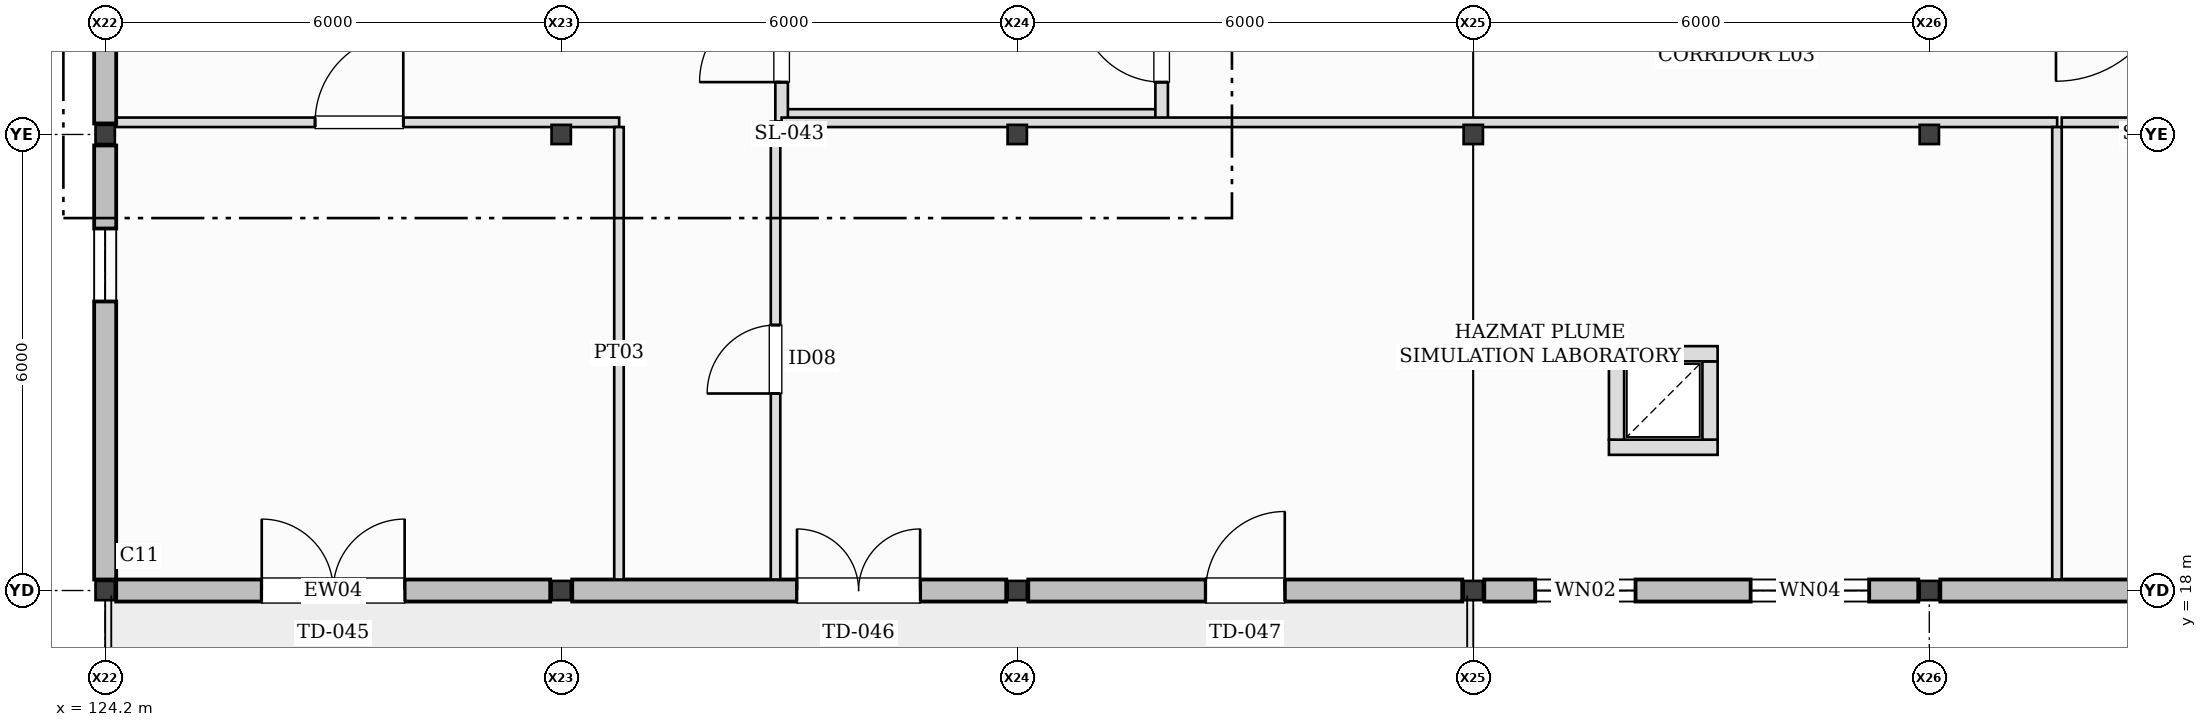
"""IFC4 building model, lengths in metres.
Left out: names, types, materials, properties, quantities, classifications, styles, units other than length and angle.
Written with IfcOpenShell. Run it as: python <this file> out.ifc"""

import sys

from ifc_helpers import new_model, si_unit, direction, frame, frame_2d, origin, origin_2d, place, context, subcontext, project, spatial, rectangle, i_section, extrude, element, fill, save


model = new_model("IFC4")
c1 = context("Model", 3, precision=1e-05, world=origin(), true_north=direction((0.0, 1.0)))
c2 = subcontext(c1, "Body", "Model", "MODEL_VIEW")
j1 = project(units=[si_unit("LENGTHUNIT", "METRE"), si_unit("PLANEANGLEUNIT", "RADIAN")], contexts=[c1])
p1 = place(None, origin())
s1 = spatial("IfcSite", under=j1, at=p1, CompositionType="ELEMENT")
p2 = place(p1, origin())
s2 = spatial("IfcBuilding", under=s1, at=p2, CompositionType="ELEMENT")
p3 = place(p2, frame((0.0, 0.0, 10.0)))
s3 = spatial("IfcBuildingStorey", under=s2, at=p3, CompositionType="ELEMENT", Elevation=10.0)
for number, where, z_axis, x_axis in (
    (1, (124.2, 18.0, 0.0), (0.0, 0.0, 1.0), (1.0, 0.0, 0.0)),
    (2, (124.2, 24.0, 0.0), (0.0, 0.0, 1.0), (1.0, 0.0, 0.0)),
    (3, (130.2, 18.0, 0.0), (0.0, 0.0, 1.0), (1.0, 0.0, 0.0)),
    (4, (130.2, 24.0, 0.0), (0.0, 0.0, 1.0), (1.0, 0.0, 0.0)),
    (5, (136.2, 18.0, 0.0), (0.0, 0.0, 1.0), (1.0, 0.0, 0.0)),
    (6, (136.2, 24.0, 0.0), (0.0, 0.0, 1.0), (1.0, 0.0, 0.0)),
    (7, (142.2, 18.0, 0.0), (0.0, 0.0, 1.0), (1.0, 0.0, 0.0)),
    (8, (142.2, 24.0, 0.0), (0.0, 0.0, 1.0), (1.0, 0.0, 0.0)),
    (9, (148.2, 18.0, 0.0), (0.0, 0.0, 1.0), (1.0, 0.0, 0.0)),
    (10, (148.2, 24.0, 0.0), (0.0, 0.0, 1.0), (1.0, 0.0, 0.0)),
):
    element("IfcColumn", number, at=place(p3, frame(where, z_axis=z_axis, x_axis=x_axis)), inside=s3, PredefinedType="COLUMN", context=c2, shape_type="SweptSolid", body=[
        extrude(i_section(OverallWidth=0.254, OverallDepth=0.253, WebThickness=0.009, FlangeThickness=0.014, at=origin_2d()), origin(), (0.0, 0.0, 1.0), 4.0),
    ])
p4 = place(p3, frame((124.345, 18.0, 0.0), z_axis=(0.0, 0.0, 1.0), x_axis=(1.0, 0.0, 0.0)))
e11 = element("IfcWall", 11, at=p4, inside=s3, PredefinedType="STANDARD", context=c2, shape_type="SweptSolid", body=[
    extrude(rectangle(XDim=5.71, YDim=0.29, at=frame_2d((2.855, 0.0))), origin(), (0.0, 0.0, 1.0), 4.0),
])
p5 = place(p4, frame((1.915, 0.0, 0.0)))
e12 = element("IfcOpeningElement", 12, at=p5, cuts=e11, PredefinedType="OPENING", context=c2, shape_type="SweptSolid", body=[
    extrude(rectangle(XDim=1.88, YDim=2.28, at=frame_2d((0.94, 1.14))), frame((0.0, 0.155, 0.0), z_axis=(0.0, -1.0, 0.0), x_axis=(1.0, 0.0, 0.0)), (0.0, 0.0, 1.0), 0.31),
])
p6 = place(p3, frame((130.345, 18.0, 0.0), z_axis=(0.0, 0.0, 1.0), x_axis=(1.0, 0.0, 0.0)))
e13 = element("IfcWall", 13, at=p6, inside=s3, PredefinedType="STANDARD", context=c2, shape_type="SweptSolid", body=[
    extrude(rectangle(XDim=5.71, YDim=0.29, at=frame_2d((2.855, 0.0))), origin(), (0.0, 0.0, 1.0), 4.0),
])
p7 = place(p6, frame((2.958, 0.0, 0.0)))
e14 = element("IfcOpeningElement", 14, at=p7, cuts=e13, PredefinedType="OPENING", context=c2, shape_type="SweptSolid", body=[
    extrude(rectangle(XDim=1.62, YDim=2.2, at=frame_2d((0.81, 1.1))), frame((0.0, 0.155, 0.0), z_axis=(0.0, -1.0, 0.0), x_axis=(1.0, 0.0, 0.0)), (0.0, 0.0, 1.0), 0.31),
])
p8 = place(p3, frame((136.345, 18.0, 0.0), z_axis=(0.0, 0.0, 1.0), x_axis=(1.0, 0.0, 0.0)))
e15 = element("IfcWall", 15, at=p8, inside=s3, PredefinedType="STANDARD", context=c2, shape_type="SweptSolid", body=[
    extrude(rectangle(XDim=5.71, YDim=0.29, at=frame_2d((2.855, 0.0))), origin(), (0.0, 0.0, 1.0), 4.0),
])
p9 = place(p8, frame((2.335, 0.0, 0.0)))
e16 = element("IfcOpeningElement", 16, at=p9, cuts=e15, PredefinedType="OPENING", context=c2, shape_type="SweptSolid", body=[
    extrude(rectangle(XDim=1.04, YDim=2.16, at=frame_2d((0.52, 1.08))), frame((0.0, 0.155, 0.0), z_axis=(0.0, -1.0, 0.0), x_axis=(1.0, 0.0, 0.0)), (0.0, 0.0, 1.0), 0.31),
])
p10 = place(p3, frame((142.345, 18.0, 0.0), z_axis=(0.0, 0.0, 1.0), x_axis=(1.0, 0.0, 0.0)))
e17 = element("IfcWall", 17, at=p10, inside=s3, PredefinedType="STANDARD", context=c2, shape_type="SweptSolid", body=[
    extrude(rectangle(XDim=5.71, YDim=0.29, at=frame_2d((2.855, 0.0))), origin(), (0.0, 0.0, 1.0), 4.0),
])
p11 = place(p10, frame((0.67, 0.0, 1.42)))
e18 = element("IfcOpeningElement", 18, at=p11, cuts=e17, PredefinedType="OPENING", context=c2, shape_type="SweptSolid", body=[
    extrude(rectangle(XDim=1.32, YDim=1.32, at=frame_2d((0.66, 0.66))), frame((0.0, 0.155, 0.0), z_axis=(0.0, -1.0, 0.0), x_axis=(1.0, 0.0, 0.0)), (0.0, 0.0, 1.0), 0.31),
])
p12 = place(p10, frame((3.504, 0.0, 1.28)))
e19 = element("IfcOpeningElement", 19, at=p12, cuts=e17, PredefinedType="OPENING", context=c2, shape_type="SweptSolid", body=[
    extrude(rectangle(XDim=1.56, YDim=1.56, at=frame_2d((0.78, 0.78))), frame((0.0, 0.155, 0.0), z_axis=(0.0, -1.0, 0.0), x_axis=(1.0, 0.0, 0.0)), (0.0, 0.0, 1.0), 0.31),
])
p13 = place(p3, frame((148.345, 18.0, 0.0), z_axis=(0.0, 0.0, 1.0), x_axis=(1.0, 0.0, 0.0)))
e20 = element("IfcWall", 20, at=p13, inside=s3, PredefinedType="STANDARD", context=c2, shape_type="SweptSolid", body=[
    extrude(rectangle(XDim=5.71, YDim=0.29, at=frame_2d((2.855, 0.0))), origin(), (0.0, 0.0, 1.0), 4.0),
])
p14 = place(p13, frame((3.567, 0.0, 0.86)))
e21 = element("IfcOpeningElement", 21, at=p14, cuts=e20, PredefinedType="OPENING", context=c2, shape_type="SweptSolid", body=[
    extrude(rectangle(XDim=0.9, YDim=0.9, at=frame_2d((0.45, 0.45))), frame((0.0, 0.155, 0.0), z_axis=(0.0, -1.0, 0.0), x_axis=(1.0, 0.0, 0.0)), (0.0, 0.0, 1.0), 0.31),
])
p15 = place(p3, frame((124.2, 23.855, 0.0), z_axis=(0.0, 0.0, 1.0), x_axis=(0.0, -1.0, 0.0)))
e22 = element("IfcWall", 22, at=p15, inside=s3, PredefinedType="STANDARD", context=c2, shape_type="SweptSolid", body=[
    extrude(rectangle(XDim=5.71, YDim=0.29, at=frame_2d((2.855, 0.0))), origin(), (0.0, 0.0, 1.0), 2.1),
])
p16 = place(p15, frame((1.092, 0.0, 0.82)))
e23 = element("IfcOpeningElement", 23, at=p16, cuts=e22, PredefinedType="OPENING", context=c2, shape_type="SweptSolid", body=[
    extrude(rectangle(XDim=0.96, YDim=0.96, at=frame_2d((0.48, 0.48))), frame((0.0, 0.155, 0.0), z_axis=(0.0, -1.0, 0.0), x_axis=(1.0, 0.0, 0.0)), (0.0, 0.0, 1.0), 0.31),
])
p17 = place(p3, frame((124.2, 29.855, 0.0), z_axis=(0.0, 0.0, 1.0), x_axis=(0.0, -1.0, 0.0)))
e24 = element("IfcWall", 24, at=p17, inside=s3, PredefinedType="STANDARD", context=c2, shape_type="SweptSolid", body=[
    extrude(rectangle(XDim=5.71, YDim=0.29, at=frame_2d((2.855, 0.0))), origin(), (0.0, 0.0, 1.0), 2.1),
])
p18 = place(p17, frame((0.775, 0.0, 0.82)))
e25 = element("IfcOpeningElement", 25, at=p18, cuts=e24, PredefinedType="OPENING", context=c2, shape_type="SweptSolid", body=[
    extrude(rectangle(XDim=1.02, YDim=1.02, at=frame_2d((0.51, 0.51))), frame((0.0, 0.155, 0.0), z_axis=(0.0, -1.0, 0.0), x_axis=(1.0, 0.0, 0.0)), (0.0, 0.0, 1.0), 0.31),
])
p19 = place(p2, frame((0.0, 0.0, 25.2)))
s4 = spatial("IfcBuildingStorey", under=s2, at=p19, CompositionType="ELEMENT", Elevation=25.2)
p20 = place(p19, frame((122.973, 18.0, -15.2), z_axis=(0.0, 0.0, 1.0), x_axis=(1.0, 0.0, 0.0)))
e26 = element("IfcWall", 26, at=p20, inside=s4, PredefinedType="STANDARD", context=c2, shape_type="SweptSolid", body=[
    extrude(rectangle(XDim=1.182, YDim=0.265, at=frame_2d((0.591, 0.0))), origin(), (0.0, 0.0, 1.0), 2.417),
])
p21 = place(p3, frame((133.02, 24.25, 0.0), z_axis=(0.0, 0.0, 1.0), x_axis=(1.0, 0.0, 0.0)))
e27 = element("IfcWall", 27, at=p21, inside=s3, PredefinedType="PARTITIONING", context=c2, shape_type="SweptSolid", body=[
    extrude(rectangle(XDim=5.16, YDim=0.165, at=frame_2d((2.58, 0.0))), origin(), (0.0, 0.0, 1.0), 3.74),
])
p22 = place(p3, frame((133.1, 24.17, 0.0), z_axis=(0.0, 0.0, 1.0), x_axis=(0.0, 1.0, 0.0)))
e28 = element("IfcWall", 28, at=p22, inside=s3, PredefinedType="PARTITIONING", context=c2, shape_type="SweptSolid", body=[
    extrude(rectangle(XDim=2.118, YDim=0.165, at=frame_2d((1.059, 0.0))), origin(), (0.0, 0.0, 1.0), 3.74),
])
p23 = place(p22, frame((0.519, 0.0, 0.0)))
e29 = element("IfcOpeningElement", 29, at=p23, cuts=e28, PredefinedType="OPENING", context=c2, shape_type="SweptSolid", body=[
    extrude(rectangle(XDim=1.08, YDim=2.14, at=frame_2d((0.54, 1.07))), frame((0.0, 0.093, 0.0), z_axis=(0.0, -1.0, 0.0), x_axis=(1.0, 0.0, 0.0)), (0.0, 0.0, 1.0), 0.185),
])
p24 = place(p3, frame((138.1, 24.17, 0.0), z_axis=(0.0, 0.0, 1.0), x_axis=(0.0, 1.0, 0.0)))
e30 = element("IfcWall", 30, at=p24, inside=s3, PredefinedType="PARTITIONING", context=c2, shape_type="SweptSolid", body=[
    extrude(rectangle(XDim=2.118, YDim=0.165, at=frame_2d((1.059, 0.0))), origin(), (0.0, 0.0, 1.0), 3.74),
])
p25 = place(p24, frame((0.519, 0.0, 0.0)))
e31 = element("IfcOpeningElement", 31, at=p25, cuts=e30, PredefinedType="OPENING", context=c2, shape_type="SweptSolid", body=[
    extrude(rectangle(XDim=1.08, YDim=2.14, at=frame_2d((0.54, 1.07))), frame((0.0, 0.093, 0.0), z_axis=(0.0, -1.0, 0.0), x_axis=(1.0, 0.0, 0.0)), (0.0, 0.0, 1.0), 0.185),
])
p26 = place(p3, frame((143.985, 19.885, 0.0), z_axis=(0.0, 0.0, 1.0), x_axis=(1.0, 0.0, 0.0)))
e32 = element("IfcWall", 32, at=p26, inside=s3, PredefinedType="PARTITIONING", context=c2, shape_type="SweptSolid", body=[
    extrude(rectangle(XDim=1.43, YDim=0.2, at=frame_2d((0.715, 0.0))), origin(), (0.0, 0.0, 1.0), 3.74),
])
p27 = place(p3, frame((145.315, 19.985, 0.0), z_axis=(0.0, 0.0, 1.0), x_axis=(0.0, 1.0, 0.0)))
e33 = element("IfcWall", 33, at=p27, inside=s3, PredefinedType="PARTITIONING", context=c2, shape_type="SweptSolid", body=[
    extrude(rectangle(XDim=1.03, YDim=0.2, at=frame_2d((0.515, 0.0))), origin(), (0.0, 0.0, 1.0), 3.74),
])
p28 = place(p3, frame((145.415, 21.115, 0.0), z_axis=(0.0, 0.0, 1.0), x_axis=(-1.0, 0.0, 0.0)))
e34 = element("IfcWall", 34, at=p28, inside=s3, PredefinedType="PARTITIONING", context=c2, shape_type="SweptSolid", body=[
    extrude(rectangle(XDim=1.43, YDim=0.2, at=frame_2d((0.715, 0.0))), origin(), (0.0, 0.0, 1.0), 3.74),
])
p29 = place(p3, frame((144.085, 21.015, 0.0), z_axis=(0.0, 0.0, 1.0), x_axis=(0.0, -1.0, 0.0)))
e35 = element("IfcWall", 35, at=p29, inside=s3, PredefinedType="PARTITIONING", context=c2, shape_type="SweptSolid", body=[
    extrude(rectangle(XDim=1.03, YDim=0.2, at=frame_2d((0.515, 0.0))), origin(), (0.0, 0.0, 1.0), 3.74),
])
p30 = place(p3, frame((124.345, 24.16, 0.0), z_axis=(0.0, 0.0, 1.0), x_axis=(1.0, 0.0, 0.0)))
e36 = element("IfcWall", 36, at=p30, inside=s3, PredefinedType="PARTITIONING", context=c2, shape_type="SweptSolid", body=[
    extrude(rectangle(XDim=6.617, YDim=0.125, at=frame_2d((3.309, 0.0))), origin(), (0.0, 0.0, 1.0), 3.74),
])
p31 = place(p30, frame((2.617, 0.0, 0.0)))
e37 = element("IfcOpeningElement", 37, at=p31, cuts=e36, PredefinedType="OPENING", context=c2, shape_type="SweptSolid", body=[
    extrude(rectangle(XDim=1.16, YDim=2.2, at=frame_2d((0.58, 1.1))), frame((0.0, 0.073, 0.0), z_axis=(0.0, -1.0, 0.0), x_axis=(1.0, 0.0, 0.0)), (0.0, 0.0, 1.0), 0.145),
])
p32 = place(p3, frame((130.96, 24.097, 0.0), z_axis=(0.0, 0.0, 1.0), x_axis=(0.0, -1.0, 0.0)))
e38 = element("IfcWall", 38, at=p32, inside=s3, PredefinedType="PARTITIONING", context=c2, shape_type="SweptSolid", body=[
    extrude(rectangle(XDim=5.952, YDim=0.125, at=frame_2d((2.976, 0.0))), origin(), (0.0, 0.0, 1.0), 3.74),
])
p33 = place(p3, frame((133.02, 18.145, 0.0), z_axis=(0.0, 0.0, 1.0), x_axis=(0.0, 1.0, 0.0)))
e39 = element("IfcWall", 39, at=p33, inside=s3, PredefinedType="PARTITIONING", context=c2, shape_type="SweptSolid", body=[
    extrude(rectangle(XDim=6.022, YDim=0.125, at=frame_2d((3.011, 0.0))), origin(), (0.0, 0.0, 1.0), 3.74),
])
p34 = place(p33, frame((2.447, 0.0, 0.0)))
e40 = element("IfcOpeningElement", 40, at=p34, cuts=e39, PredefinedType="OPENING", context=c2, shape_type="SweptSolid", body=[
    extrude(rectangle(XDim=0.9, YDim=2.1, at=frame_2d((0.45, 1.05))), frame((0.0, 0.073, 0.0), z_axis=(0.0, -1.0, 0.0), x_axis=(1.0, 0.0, 0.0)), (0.0, 0.0, 1.0), 0.145),
])
p35 = place(p3, frame((133.1, 24.16, 0.0), z_axis=(0.0, 0.0, 1.0), x_axis=(1.0, 0.0, 0.0)))
e41 = element("IfcWall", 41, at=p35, inside=s3, PredefinedType="PARTITIONING", context=c2, shape_type="SweptSolid", body=[
    extrude(rectangle(XDim=16.782, YDim=0.125, at=frame_2d((8.391, 0.0))), origin(), (0.0, 0.0, 1.0), 3.74),
])
p36 = place(p3, frame((149.88, 24.097, 0.0), z_axis=(0.0, 0.0, 1.0), x_axis=(0.0, -1.0, 0.0)))
e42 = element("IfcWall", 42, at=p36, inside=s3, PredefinedType="PARTITIONING", context=c2, shape_type="SweptSolid", body=[
    extrude(rectangle(XDim=5.952, YDim=0.125, at=frame_2d((2.976, 0.0))), origin(), (0.0, 0.0, 1.0), 3.74),
])
p37 = place(p3, frame((149.942, 24.16, 0.0), z_axis=(0.0, 0.0, 1.0), x_axis=(1.0, 0.0, 0.0)))
e43 = element("IfcWall", 43, at=p37, inside=s3, PredefinedType="PARTITIONING", context=c2, shape_type="SweptSolid", body=[
    extrude(rectangle(XDim=16.113, YDim=0.125, at=frame_2d((8.056, 0.0))), origin(), (0.0, 0.0, 1.0), 3.74),
])
p38 = place(p37, frame((7.51, 0.0, 0.0)))
e44 = element("IfcOpeningElement", 44, at=p38, cuts=e43, PredefinedType="OPENING", context=c2, shape_type="SweptSolid", body=[
    extrude(rectangle(XDim=0.87, YDim=2.06, at=frame_2d((0.435, 1.03))), frame((0.0, 0.073, 0.0), z_axis=(0.0, -1.0, 0.0), x_axis=(1.0, 0.0, 0.0)), (0.0, 0.0, 1.0), 0.145),
])
p39 = place(p5, frame((1.88, 0.0, 0.0), z_axis=(0.0, 0.0, 1.0), x_axis=(-1.0, 0.0, 0.0)))
e45 = element("IfcDoor", 45, at=p39, inside=s3, OperationType="DOUBLE_DOOR_SINGLE_SWING", PredefinedType="DOOR", context=c2, shape_type="SweptSolid", body=[
    extrude(rectangle(XDim=1.88, YDim=2.28, at=frame_2d((0.94, 1.14))), frame((0.0, 0.025, 0.0), z_axis=(0.0, -1.0, 0.0), x_axis=(1.0, 0.0, 0.0)), (0.0, 0.0, 1.0), 0.05),
])
fill(e12, e45)
p40 = place(p7, frame((1.62, 0.0, 0.0), z_axis=(0.0, 0.0, 1.0), x_axis=(-1.0, 0.0, 0.0)))
e46 = element("IfcDoor", 46, at=p40, inside=s3, OperationType="DOUBLE_DOOR_SINGLE_SWING", PredefinedType="DOOR", context=c2, shape_type="SweptSolid", body=[
    extrude(rectangle(XDim=1.62, YDim=2.2, at=frame_2d((0.81, 1.1))), frame((0.0, 0.025, 0.0), z_axis=(0.0, -1.0, 0.0), x_axis=(1.0, 0.0, 0.0)), (0.0, 0.0, 1.0), 0.05),
])
fill(e14, e46)
p41 = place(p9, frame((1.04, 0.0, 0.0), z_axis=(0.0, 0.0, 1.0), x_axis=(-1.0, 0.0, 0.0)))
e47 = element("IfcDoor", 47, at=p41, inside=s3, OperationType="SINGLE_SWING_RIGHT", PredefinedType="DOOR", context=c2, shape_type="SweptSolid", body=[
    extrude(rectangle(XDim=1.04, YDim=2.16, at=frame_2d((0.52, 1.08))), frame((0.0, 0.025, 0.0), z_axis=(0.0, -1.0, 0.0), x_axis=(1.0, 0.0, 0.0)), (0.0, 0.0, 1.0), 0.05),
])
fill(e16, e47)
p42 = place(p11, origin())
e48 = element("IfcWindow", 48, at=p42, inside=s3, PartitioningType="SINGLE_PANEL", PredefinedType="WINDOW", context=c2, shape_type="SweptSolid", body=[
    extrude(rectangle(XDim=1.32, YDim=1.32, at=frame_2d((0.66, 0.66))), frame((0.0, 0.03, 0.0), z_axis=(0.0, -1.0, 0.0), x_axis=(1.0, 0.0, 0.0)), (0.0, 0.0, 1.0), 0.06),
])
fill(e18, e48)
p43 = place(p12, origin())
e49 = element("IfcWindow", 49, at=p43, inside=s3, PartitioningType="SINGLE_PANEL", PredefinedType="WINDOW", context=c2, shape_type="SweptSolid", body=[
    extrude(rectangle(XDim=1.56, YDim=1.56, at=frame_2d((0.78, 0.78))), frame((0.0, 0.03, 0.0), z_axis=(0.0, -1.0, 0.0), x_axis=(1.0, 0.0, 0.0)), (0.0, 0.0, 1.0), 0.06),
])
fill(e19, e49)
p44 = place(p16, origin())
e50 = element("IfcWindow", 50, at=p44, inside=s3, PartitioningType="SINGLE_PANEL", PredefinedType="WINDOW", context=c2, shape_type="SweptSolid", body=[
    extrude(rectangle(XDim=0.96, YDim=0.96, at=frame_2d((0.48, 0.48))), frame((0.0, 0.03, 0.0), z_axis=(0.0, -1.0, 0.0), x_axis=(1.0, 0.0, 0.0)), (0.0, 0.0, 1.0), 0.06),
])
fill(e23, e50)
p45 = place(p23, frame((1.08, 0.0, 0.0), z_axis=(0.0, 0.0, 1.0), x_axis=(-1.0, 0.0, 0.0)))
e51 = element("IfcDoor", 51, at=p45, inside=s3, OperationType="SINGLE_SWING_LEFT", PredefinedType="DOOR", context=c2, shape_type="SweptSolid", body=[
    extrude(rectangle(XDim=1.08, YDim=2.14, at=frame_2d((0.54, 1.07))), frame((0.0, 0.025, 0.0), z_axis=(0.0, -1.0, 0.0), x_axis=(1.0, 0.0, 0.0)), (0.0, 0.0, 1.0), 0.05),
])
fill(e29, e51)
p46 = place(p25, origin())
e52 = element("IfcDoor", 52, at=p46, inside=s3, OperationType="SINGLE_SWING_RIGHT", PredefinedType="DOOR", context=c2, shape_type="SweptSolid", body=[
    extrude(rectangle(XDim=1.08, YDim=2.14, at=frame_2d((0.54, 1.07))), frame((0.0, 0.025, 0.0), z_axis=(0.0, -1.0, 0.0), x_axis=(1.0, 0.0, 0.0)), (0.0, 0.0, 1.0), 0.05),
])
fill(e31, e52)
p47 = place(p31, frame((1.16, 0.0, 0.0), z_axis=(0.0, 0.0, 1.0), x_axis=(-1.0, 0.0, 0.0)))
e53 = element("IfcDoor", 53, at=p47, inside=s3, OperationType="SINGLE_SWING_RIGHT", PredefinedType="DOOR", context=c2, shape_type="SweptSolid", body=[
    extrude(rectangle(XDim=1.16, YDim=2.2, at=frame_2d((0.58, 1.1))), frame((0.0, 0.025, 0.0), z_axis=(0.0, -1.0, 0.0), x_axis=(1.0, 0.0, 0.0)), (0.0, 0.0, 1.0), 0.05),
])
fill(e37, e53)
p48 = place(p34, frame((0.9, 0.0, 0.0), z_axis=(0.0, 0.0, 1.0), x_axis=(-1.0, 0.0, 0.0)))
e54 = element("IfcDoor", 54, at=p48, inside=s3, OperationType="SINGLE_SWING_LEFT", PredefinedType="DOOR", context=c2, shape_type="SweptSolid", body=[
    extrude(rectangle(XDim=0.9, YDim=2.1, at=frame_2d((0.45, 1.05))), frame((0.0, 0.025, 0.0), z_axis=(0.0, -1.0, 0.0), x_axis=(1.0, 0.0, 0.0)), (0.0, 0.0, 1.0), 0.05),
])
fill(e40, e54)
save(model, sys.argv[1])
